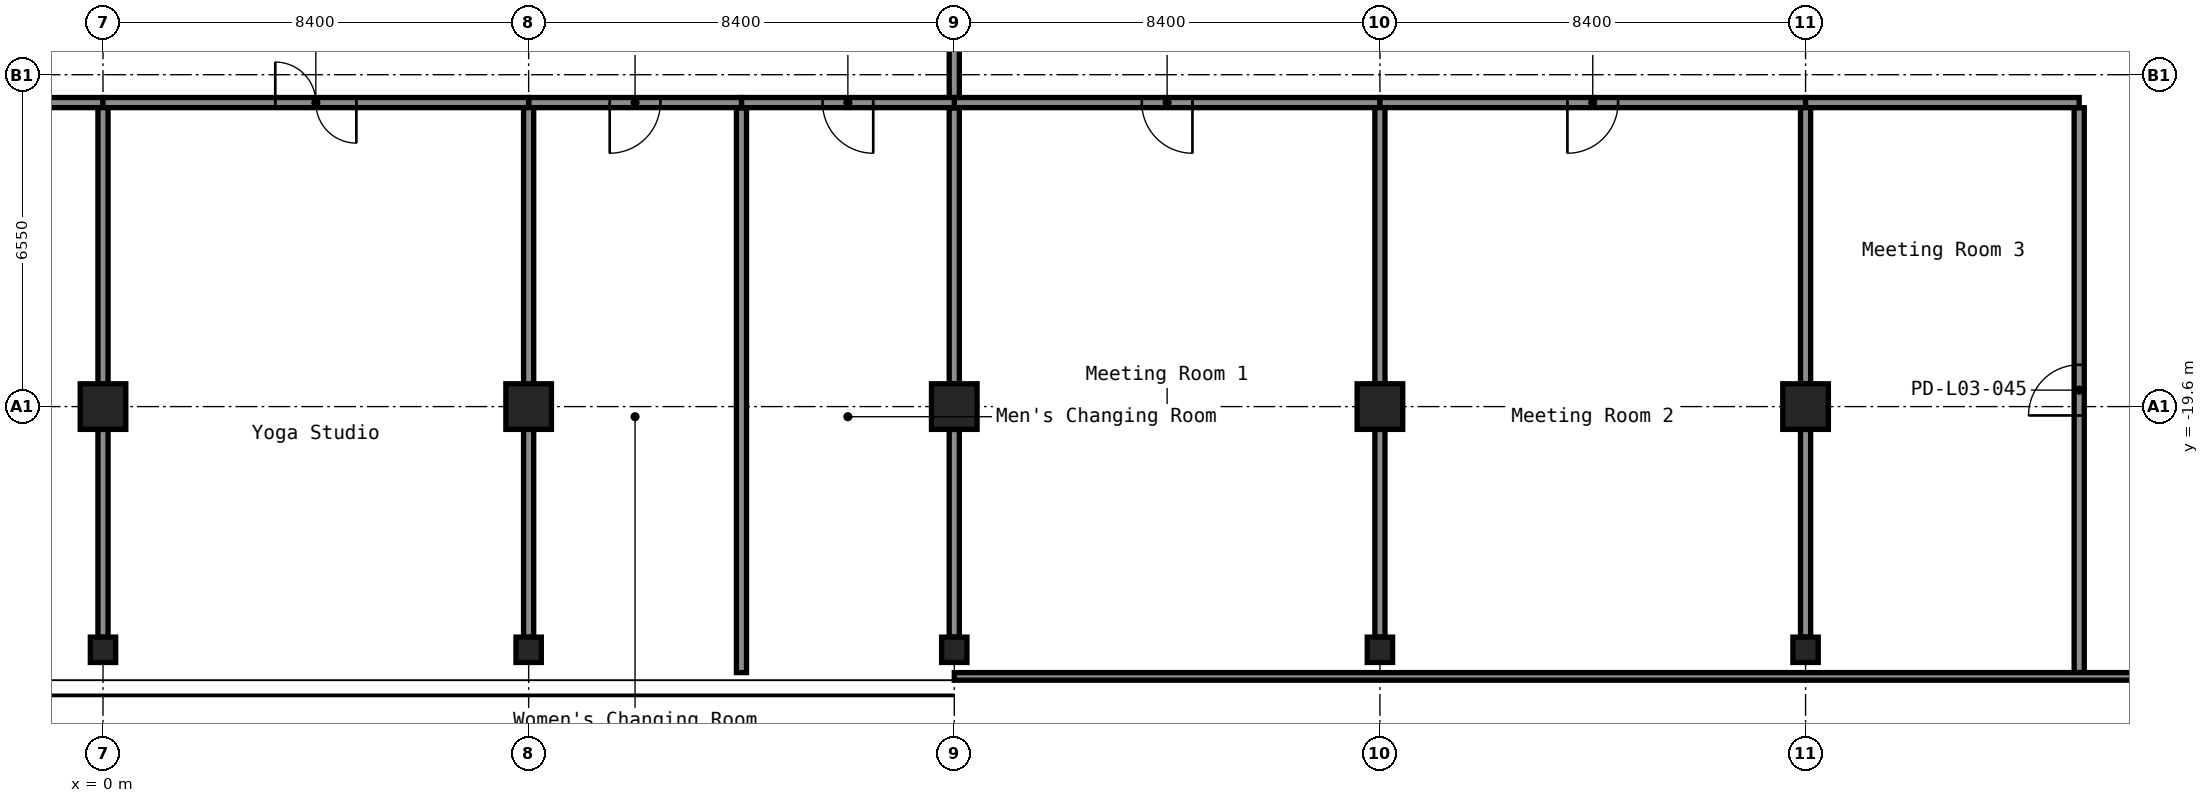
"""IFC4 building model, lengths in metres.
Left out: names, types, materials, properties, quantities, classifications, styles, units other than length and angle.
Written with IfcOpenShell. Run it as: python <this file> out.ifc"""

import sys

from ifc_helpers import new_model, si_unit, direction, frame, frame_2d, origin, origin_2d, place, context, subcontext, project, spatial, rectangle, hollow_rectangle, extrude, element, fill, save


model = new_model("IFC4")
c1 = context("Model", 3, precision=1e-05, world=origin(), true_north=direction((0.0, 1.0)))
c2 = subcontext(c1, "Body", "Model", "MODEL_VIEW")
j1 = project(units=[si_unit("LENGTHUNIT", "METRE"), si_unit("PLANEANGLEUNIT", "RADIAN")], contexts=[c1])
p1 = place(None, origin())
s1 = spatial("IfcSite", under=j1, at=p1, CompositionType="ELEMENT")
p2 = place(p1, origin())
s2 = spatial("IfcBuilding", under=s1, at=p2, CompositionType="ELEMENT")
p3 = place(p2, frame((0.0, 0.0, 15.0)))
s3 = spatial("IfcBuildingStorey", under=s2, at=p3, CompositionType="ELEMENT", Elevation=15.0)
for number, where, z_axis, x_axis in (
    (1, (0.0, -19.6, 0.0), (0.0, 0.0, 1.0), (1.0, 0.0, 0.0)),
    (2, (8.4, -19.6, 0.0), (0.0, 0.0, 1.0), (1.0, 0.0, 0.0)),
    (3, (16.8, -19.6, 0.0), (0.0, 0.0, 1.0), (1.0, 0.0, 0.0)),
    (4, (25.2, -19.6, 0.0), (0.0, 0.0, 1.0), (1.0, 0.0, 0.0)),
    (5, (33.6, -19.6, 0.0), (0.0, 0.0, 1.0), (1.0, 0.0, 0.0)),
):
    element("IfcColumn", number, at=place(p3, frame(where, z_axis=z_axis, x_axis=x_axis)), inside=s3, PredefinedType="COLUMN", context=c2, shape_type="SweptSolid", body=[
        extrude(hollow_rectangle(XDim=0.9, YDim=0.9, WallThickness=0.036, at=origin_2d()), origin(), (0.0, 0.0, 1.0), 4.4),
    ])
for number, where, z_axis, x_axis in (
    (6, (0.0, -24.4, 0.0), (0.0, 0.0, 1.0), (1.0, 0.0, 0.0)),
    (7, (8.4, -24.4, 0.0), (0.0, 0.0, 1.0), (1.0, 0.0, 0.0)),
    (8, (16.8, -24.4, 0.0), (0.0, 0.0, 1.0), (1.0, 0.0, 0.0)),
    (9, (25.2, -24.4, 0.0), (0.0, 0.0, 1.0), (1.0, 0.0, 0.0)),
    (10, (33.6, -24.4, 0.0), (0.0, 0.0, 1.0), (1.0, 0.0, 0.0)),
):
    element("IfcColumn", number, at=place(p3, frame(where, z_axis=z_axis, x_axis=x_axis)), inside=s3, PredefinedType="COLUMN", context=c2, shape_type="SweptSolid", body=[
        extrude(hollow_rectangle(XDim=0.5, YDim=0.5, WallThickness=0.019, InnerFilletRadius=0.029, OuterFilletRadius=0.048, at=origin_2d()), origin(), (0.0, 0.0, 1.0), 4.4),
    ])
p4 = place(p3, frame((16.8, -13.7, 0.0), z_axis=(0.0, 0.0, 1.0), x_axis=(0.0, -1.0, 0.0)))
e11 = element("IfcWall", 11, at=p4, inside=s3, PredefinedType="PARTITIONING", context=c2, shape_type="SweptSolid", body=[
    extrude(rectangle(XDim=5.45, YDim=0.2, at=frame_2d((2.725, 0.0))), origin(), (0.0, 0.0, 1.0), 4.4),
])
p5 = place(p3, frame((16.8, -20.05, 0.0), z_axis=(0.0, 0.0, 1.0), x_axis=(0.0, -1.0, 0.0)))
e12 = element("IfcWall", 12, at=p5, inside=s3, PredefinedType="PARTITIONING", context=c2, shape_type="SweptSolid", body=[
    extrude(rectangle(XDim=4.1, YDim=0.2, at=frame_2d((2.05, 0.0))), origin(), (0.0, 0.0, 1.0), 4.4),
])
p6 = place(p3, frame((12.6, -13.7, 0.0), z_axis=(0.0, 0.0, 1.0), x_axis=(0.0, -1.0, 0.0)))
e13 = element("IfcWall", 13, at=p6, inside=s3, PredefinedType="PARTITIONING", context=c2, shape_type="SweptSolid", body=[
    extrude(rectangle(XDim=11.15, YDim=0.2, at=frame_2d((5.575, 0.0))), origin(), (0.0, 0.0, 1.0), 4.4),
])
p7 = place(p3, frame((25.2, -13.6, 0.0), z_axis=(0.0, 0.0, 1.0), x_axis=(-1.0, 0.0, 0.0)))
e14 = element("IfcWall", 14, at=p7, inside=s3, PredefinedType="PARTITIONING", context=c2, shape_type="SweptSolid", body=[
    extrude(rectangle(XDim=8.4, YDim=0.2, at=frame_2d((4.2, 0.0))), origin(), (0.0, 0.0, 1.0), 4.4),
])
p8 = place(p7, frame((3.7, 0.0, 0.0)))
e15 = element("IfcOpeningElement", 15, at=p8, cuts=e14, PredefinedType="OPENING", context=c2, shape_type="SweptSolid", body=[
    extrude(rectangle(XDim=1.0, YDim=2.1, at=frame_2d((0.5, 1.05))), frame((0.0, 0.11, 0.0), z_axis=(0.0, -1.0, 0.0), x_axis=(1.0, 0.0, 0.0)), (0.0, 0.0, 1.0), 0.22),
])
p9 = place(p3, frame((33.6, -13.6, 0.0), z_axis=(0.0, 0.0, 1.0), x_axis=(-1.0, 0.0, 0.0)))
e16 = element("IfcWall", 16, at=p9, inside=s3, PredefinedType="PARTITIONING", context=c2, shape_type="SweptSolid", body=[
    extrude(rectangle(XDim=8.4, YDim=0.2, at=frame_2d((4.2, 0.0))), origin(), (0.0, 0.0, 1.0), 4.4),
])
p10 = place(p9, frame((3.7, 0.0, 0.0)))
e17 = element("IfcOpeningElement", 17, at=p10, cuts=e16, PredefinedType="OPENING", context=c2, shape_type="SweptSolid", body=[
    extrude(rectangle(XDim=1.0, YDim=2.1, at=frame_2d((0.5, 1.05))), frame((0.0, 0.11, 0.0), z_axis=(0.0, -1.0, 0.0), x_axis=(1.0, 0.0, 0.0)), (0.0, 0.0, 1.0), 0.22),
])
p11 = place(p3, frame((39.0, -24.85, 0.0), z_axis=(0.0, 0.0, 1.0), x_axis=(0.0, 1.0, 0.0)))
e18 = element("IfcWall", 18, at=p11, inside=s3, PredefinedType="PARTITIONING", context=c2, shape_type="SweptSolid", body=[
    extrude(rectangle(XDim=11.15, YDim=0.2, at=frame_2d((5.575, 0.0))), origin(), (0.0, 0.0, 1.0), 4.4),
])
p12 = place(p11, frame((5.075, 0.0, 0.0)))
e19 = element("IfcOpeningElement", 19, at=p12, cuts=e18, PredefinedType="OPENING", context=c2, shape_type="SweptSolid", body=[
    extrude(rectangle(XDim=1.0, YDim=2.1, at=frame_2d((0.5, 1.05))), frame((0.0, 0.11, 0.0), z_axis=(0.0, -1.0, 0.0), x_axis=(1.0, 0.0, 0.0)), (0.0, 0.0, 1.0), 0.22),
])
p13 = place(p3, frame((39.0, -13.6, 0.0), z_axis=(0.0, 0.0, 1.0), x_axis=(-1.0, 0.0, 0.0)))
e20 = element("IfcWall", 20, at=p13, inside=s3, PredefinedType="PARTITIONING", context=c2, shape_type="SweptSolid", body=[
    extrude(rectangle(XDim=5.4, YDim=0.2, at=frame_2d((2.7, 0.0))), origin(), (0.0, 0.0, 1.0), 4.4),
])
p14 = place(p3, frame((16.8, -13.5, 0.0), z_axis=(0.0, 0.0, 1.0), x_axis=(0.0, 1.0, 0.0)))
e21 = element("IfcWall", 21, at=p14, inside=s3, PredefinedType="PARTITIONING", context=c2, shape_type="SweptSolid", body=[
    extrude(rectangle(XDim=5.1, YDim=0.2, at=frame_2d((2.55, 0.0))), origin(), (0.0, 0.0, 1.0), 4.4),
])
p15 = place(p3, frame((25.2, -13.7, 0.0), z_axis=(0.0, 0.0, 1.0), x_axis=(0.0, -1.0, 0.0)))
e22 = element("IfcWall", 22, at=p15, inside=s3, PredefinedType="PARTITIONING", context=c2, shape_type="SweptSolid", body=[
    extrude(rectangle(XDim=5.45, YDim=0.2, at=frame_2d((2.725, 0.0))), origin(), (0.0, 0.0, 1.0), 4.4),
])
p16 = place(p3, frame((25.2, -20.05, 0.0), z_axis=(0.0, 0.0, 1.0), x_axis=(0.0, -1.0, 0.0)))
e23 = element("IfcWall", 23, at=p16, inside=s3, PredefinedType="PARTITIONING", context=c2, shape_type="SweptSolid", body=[
    extrude(rectangle(XDim=4.1, YDim=0.2, at=frame_2d((2.05, 0.0))), origin(), (0.0, 0.0, 1.0), 4.4),
])
p17 = place(p3, frame((33.6, -13.7, 0.0), z_axis=(0.0, 0.0, 1.0), x_axis=(0.0, -1.0, 0.0)))
e24 = element("IfcWall", 24, at=p17, inside=s3, PredefinedType="PARTITIONING", context=c2, shape_type="SweptSolid", body=[
    extrude(rectangle(XDim=5.45, YDim=0.2, at=frame_2d((2.725, 0.0))), origin(), (0.0, 0.0, 1.0), 4.4),
])
p18 = place(p3, frame((33.6, -20.05, 0.0), z_axis=(0.0, 0.0, 1.0), x_axis=(0.0, -1.0, 0.0)))
e25 = element("IfcWall", 25, at=p18, inside=s3, PredefinedType="PARTITIONING", context=c2, shape_type="SweptSolid", body=[
    extrude(rectangle(XDim=4.1, YDim=0.2, at=frame_2d((2.05, 0.0))), origin(), (0.0, 0.0, 1.0), 4.4),
])
p19 = place(p3, frame((16.8, -13.6, 0.0), z_axis=(0.0, 0.0, 1.0), x_axis=(-1.0, 0.0, 0.0)))
e26 = element("IfcWall", 26, at=p19, inside=s3, PredefinedType="PARTITIONING", context=c2, shape_type="SweptSolid", body=[
    extrude(rectangle(XDim=4.2, YDim=0.2, at=frame_2d((2.1, 0.0))), origin(), (0.0, 0.0, 1.0), 4.4),
])
p20 = place(p19, frame((1.6, 0.0, 0.0)))
e27 = element("IfcOpeningElement", 27, at=p20, cuts=e26, PredefinedType="OPENING", context=c2, shape_type="SweptSolid", body=[
    extrude(rectangle(XDim=1.0, YDim=2.1, at=frame_2d((0.5, 1.05))), frame((0.0, 0.11, 0.0), z_axis=(0.0, -1.0, 0.0), x_axis=(1.0, 0.0, 0.0)), (0.0, 0.0, 1.0), 0.22),
])
p21 = place(p3, frame((12.6, -13.6, 0.0), z_axis=(0.0, 0.0, 1.0), x_axis=(-1.0, 0.0, 0.0)))
e28 = element("IfcWall", 28, at=p21, inside=s3, PredefinedType="PARTITIONING", context=c2, shape_type="SweptSolid", body=[
    extrude(rectangle(XDim=4.2, YDim=0.2, at=frame_2d((2.1, 0.0))), origin(), (0.0, 0.0, 1.0), 4.4),
])
p22 = place(p21, frame((1.6, 0.0, 0.0)))
e29 = element("IfcOpeningElement", 29, at=p22, cuts=e28, PredefinedType="OPENING", context=c2, shape_type="SweptSolid", body=[
    extrude(rectangle(XDim=1.0, YDim=2.1, at=frame_2d((0.5, 1.05))), frame((0.0, 0.11, 0.0), z_axis=(0.0, -1.0, 0.0), x_axis=(1.0, 0.0, 0.0)), (0.0, 0.0, 1.0), 0.22),
])
p23 = place(p3, frame((0.0, -13.6, 0.0), z_axis=(0.0, 0.0, 1.0), x_axis=(-1.0, 0.0, 0.0)))
e30 = element("IfcWall", 30, at=p23, inside=s3, PredefinedType="PARTITIONING", context=c2, shape_type="SweptSolid", body=[
    extrude(rectangle(XDim=8.3, YDim=0.2, at=frame_2d((4.15, 0.0))), origin(), (0.0, 0.0, 1.0), 4.4),
])
p24 = place(p23, frame((3.4, 0.0, 0.0)))
e31 = element("IfcOpeningElement", 31, at=p24, cuts=e30, PredefinedType="OPENING", context=c2, shape_type="SweptSolid", body=[
    extrude(rectangle(XDim=1.6, YDim=2.1, at=frame_2d((0.8, 1.05))), frame((0.0, 0.11, 0.0), z_axis=(0.0, -1.0, 0.0), x_axis=(1.0, 0.0, 0.0)), (0.0, 0.0, 1.0), 0.22),
])
p25 = place(p3, frame((8.4, -13.6, 0.0), z_axis=(0.0, 0.0, 1.0), x_axis=(-1.0, 0.0, 0.0)))
e32 = element("IfcWall", 32, at=p25, inside=s3, PredefinedType="PARTITIONING", context=c2, shape_type="SweptSolid", body=[
    extrude(rectangle(XDim=8.4, YDim=0.2, at=frame_2d((4.2, 0.0))), origin(), (0.0, 0.0, 1.0), 4.4),
])
p26 = place(p25, frame((3.4, 0.0, 0.0)))
e33 = element("IfcOpeningElement", 33, at=p26, cuts=e32, PredefinedType="OPENING", context=c2, shape_type="SweptSolid", body=[
    extrude(rectangle(XDim=1.6, YDim=2.1, at=frame_2d((0.8, 1.05))), frame((0.0, 0.11, 0.0), z_axis=(0.0, -1.0, 0.0), x_axis=(1.0, 0.0, 0.0)), (0.0, 0.0, 1.0), 0.22),
])
p27 = place(p3, frame((0.0, -13.7, 0.0), z_axis=(0.0, 0.0, 1.0), x_axis=(0.0, -1.0, 0.0)))
e34 = element("IfcWall", 34, at=p27, inside=s3, PredefinedType="PARTITIONING", context=c2, shape_type="SweptSolid", body=[
    extrude(rectangle(XDim=5.45, YDim=0.2, at=frame_2d((2.725, 0.0))), origin(), (0.0, 0.0, 1.0), 4.4),
])
p28 = place(p3, frame((0.0, -20.05, 0.0), z_axis=(0.0, 0.0, 1.0), x_axis=(0.0, -1.0, 0.0)))
e35 = element("IfcWall", 35, at=p28, inside=s3, PredefinedType="PARTITIONING", context=c2, shape_type="SweptSolid", body=[
    extrude(rectangle(XDim=4.1, YDim=0.2, at=frame_2d((2.05, 0.0))), origin(), (0.0, 0.0, 1.0), 4.4),
])
p29 = place(p3, frame((8.4, -13.7, 0.0), z_axis=(0.0, 0.0, 1.0), x_axis=(0.0, -1.0, 0.0)))
e36 = element("IfcWall", 36, at=p29, inside=s3, PredefinedType="PARTITIONING", context=c2, shape_type="SweptSolid", body=[
    extrude(rectangle(XDim=5.45, YDim=0.2, at=frame_2d((2.725, 0.0))), origin(), (0.0, 0.0, 1.0), 4.4),
])
p30 = place(p3, frame((8.4, -20.05, 0.0), z_axis=(0.0, 0.0, 1.0), x_axis=(0.0, -1.0, 0.0)))
e37 = element("IfcWall", 37, at=p30, inside=s3, PredefinedType="PARTITIONING", context=c2, shape_type="SweptSolid", body=[
    extrude(rectangle(XDim=4.1, YDim=0.2, at=frame_2d((2.05, 0.0))), origin(), (0.0, 0.0, 1.0), 4.4),
])
p31 = place(p3, frame((51.98, -24.925, 0.0), z_axis=(0.0, 0.0, 1.0), x_axis=(-1.0, 0.0, 0.0)))
e38 = element("IfcWall", 38, at=p31, inside=s3, PredefinedType="STANDARD", context=c2, shape_type="SweptSolid", body=[
    extrude(rectangle(XDim=35.18, YDim=0.15, at=frame_2d((17.59, 0.0))), origin(), (0.0, 0.0, 1.0), 4.4),
])
p32 = place(p26, origin())
e39 = element("IfcDoor", 39, at=p32, inside=s3, OperationType="DOUBLE_DOOR_DOUBLE_SWING", PredefinedType="DOOR", context=c2, shape_type="SweptSolid", body=[
    extrude(rectangle(XDim=1.6, YDim=2.1, at=frame_2d((0.8, 1.05))), frame((0.0, 0.025, 0.0), z_axis=(0.0, -1.0, 0.0), x_axis=(1.0, 0.0, 0.0)), (0.0, 0.0, 1.0), 0.05),
])
fill(e33, e39)
p33 = place(p22, origin())
e40 = element("IfcDoor", 40, at=p33, inside=s3, OperationType="SINGLE_SWING_LEFT", PredefinedType="DOOR", context=c2, shape_type="SweptSolid", body=[
    extrude(rectangle(XDim=1.0, YDim=2.1, at=frame_2d((0.5, 1.05))), frame((0.0, 0.025, 0.0), z_axis=(0.0, -1.0, 0.0), x_axis=(1.0, 0.0, 0.0)), (0.0, 0.0, 1.0), 0.05),
])
fill(e29, e40)
p34 = place(p20, origin())
e41 = element("IfcDoor", 41, at=p34, inside=s3, OperationType="SINGLE_SWING_RIGHT", PredefinedType="DOOR", context=c2, shape_type="SweptSolid", body=[
    extrude(rectangle(XDim=1.0, YDim=2.1, at=frame_2d((0.5, 1.05))), frame((0.0, 0.025, 0.0), z_axis=(0.0, -1.0, 0.0), x_axis=(1.0, 0.0, 0.0)), (0.0, 0.0, 1.0), 0.05),
])
fill(e27, e41)
p35 = place(p8, origin())
e42 = element("IfcDoor", 42, at=p35, inside=s3, OperationType="SINGLE_SWING_RIGHT", PredefinedType="DOOR", context=c2, shape_type="SweptSolid", body=[
    extrude(rectangle(XDim=1.0, YDim=2.1, at=frame_2d((0.5, 1.05))), frame((0.0, 0.025, 0.0), z_axis=(0.0, -1.0, 0.0), x_axis=(1.0, 0.0, 0.0)), (0.0, 0.0, 1.0), 0.05),
])
fill(e15, e42)
p36 = place(p10, origin())
e43 = element("IfcDoor", 43, at=p36, inside=s3, OperationType="SINGLE_SWING_LEFT", PredefinedType="DOOR", context=c2, shape_type="SweptSolid", body=[
    extrude(rectangle(XDim=1.0, YDim=2.1, at=frame_2d((0.5, 1.05))), frame((0.0, 0.025, 0.0), z_axis=(0.0, -1.0, 0.0), x_axis=(1.0, 0.0, 0.0)), (0.0, 0.0, 1.0), 0.05),
])
fill(e17, e43)
p37 = place(p12, origin())
e44 = element("IfcDoor", 44, at=p37, inside=s3, OperationType="SINGLE_SWING_RIGHT", PredefinedType="DOOR", context=c2, shape_type="SweptSolid", body=[
    extrude(rectangle(XDim=1.0, YDim=2.1, at=frame_2d((0.5, 1.05))), frame((0.0, 0.025, 0.0), z_axis=(0.0, -1.0, 0.0), x_axis=(1.0, 0.0, 0.0)), (0.0, 0.0, 1.0), 0.05),
])
fill(e19, e44)
save(model, sys.argv[1])
